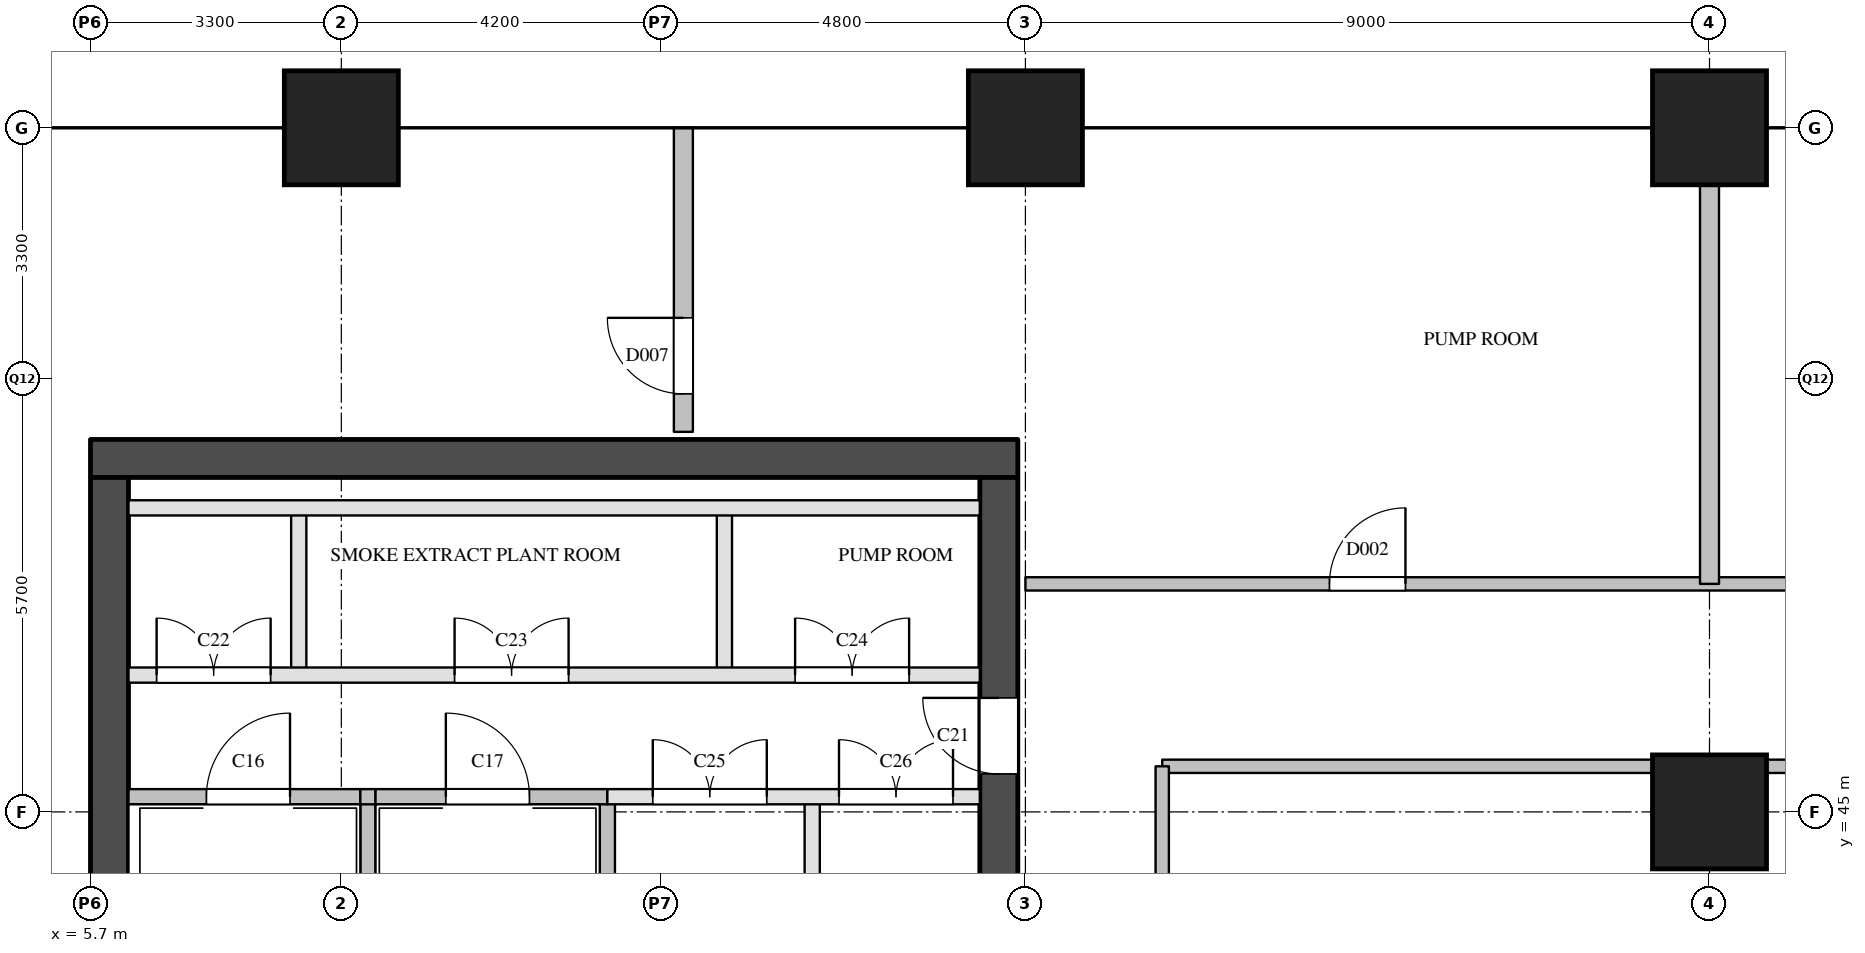
"""IFC4 building model, lengths in metres.
Left out: names, types, materials, properties, quantities, classifications, styles, units other than length and angle.
Written with IfcOpenShell. Run it as: python <this file> out.ifc"""

import sys

from ifc_helpers import new_model, si_unit, direction, frame, frame_2d, origin, origin_2d, place, context, subcontext, project, spatial, rectangle, extrude, element, fill, save


model = new_model("IFC4")
c1 = context("Model", 3, precision=1e-05, world=origin(), true_north=direction((0.0, 1.0)))
c2 = subcontext(c1, "Body", "Model", "MODEL_VIEW")
j1 = project(units=[si_unit("LENGTHUNIT", "METRE"), si_unit("PLANEANGLEUNIT", "RADIAN")], contexts=[c1])
p1 = place(None, origin())
s1 = spatial("IfcSite", under=j1, at=p1, CompositionType="ELEMENT")
p2 = place(p1, origin())
s2 = spatial("IfcBuilding", under=s1, at=p2, CompositionType="ELEMENT")
p3 = place(p2, frame((0.0, 0.0, 197.3)))
s3 = spatial("IfcBuildingStorey", under=s2, at=p3, CompositionType="ELEMENT", Elevation=197.3)
for number, where, z_axis, x_axis in (
    (1, (9.0, 54.0, 0.0), (0.0, 0.0, 1.0), (1.0, 0.0, 0.0)),
    (2, (18.0, 54.0, 0.0), (0.0, 0.0, 1.0), (1.0, 0.0, 0.0)),
    (3, (27.0, 45.0, 0.0), (0.0, 0.0, 1.0), (1.0, 0.0, 0.0)),
    (4, (27.0, 54.0, 0.0), (0.0, 0.0, 1.0), (1.0, 0.0, 0.0)),
):
    element("IfcColumn", number, at=place(p3, frame(where, z_axis=z_axis, x_axis=x_axis)), inside=s3, PredefinedType="COLUMN", context=c2, shape_type="SweptSolid", body=[
        extrude(rectangle(XDim=1.5, YDim=1.5, at=origin_2d()), origin(), (0.0, 0.0, 1.0), 6.0),
    ])
p4 = place(p3, frame((5.7, 49.65, 0.0), z_axis=(0.0, 0.0, 1.0), x_axis=(1.0, 0.0, 0.0)))
e5 = element("IfcWall", 5, at=p4, inside=s3, PredefinedType="SHEAR", context=c2, shape_type="SweptSolid", body=[
    extrude(rectangle(XDim=12.2, YDim=0.5, at=frame_2d((6.1, 0.0))), origin(), (0.0, 0.0, 1.0), 5.7),
])
p5 = place(p3, frame((5.95, 29.1, 0.0), z_axis=(0.0, 0.0, 1.0), x_axis=(0.0, 1.0, 0.0)))
e6 = element("IfcWall", 6, at=p5, inside=s3, PredefinedType="SHEAR", context=c2, shape_type="SweptSolid", body=[
    extrude(rectangle(XDim=20.3, YDim=0.5, at=frame_2d((10.15, 0.0))), origin(), (0.0, 0.0, 1.0), 5.7),
])
p6 = place(p5, frame((3.45, 0.0, 0.0)))
e7 = element("IfcOpeningElement", 7, at=p6, cuts=e6, PredefinedType="OPENING", context=c2, shape_type="SweptSolid", body=[
    extrude(rectangle(XDim=1.0, YDim=2.1, at=frame_2d((0.5, 1.05))), frame((0.0, 0.26, 0.0), z_axis=(0.0, -1.0, 0.0), x_axis=(1.0, 0.0, 0.0)), (0.0, 0.0, 1.0), 0.52),
])
p7 = place(p3, frame((17.65, 29.1, 0.0), z_axis=(0.0, 0.0, 1.0), x_axis=(0.0, 1.0, 0.0)))
e8 = element("IfcWall", 8, at=p7, inside=s3, PredefinedType="SHEAR", context=c2, shape_type="SweptSolid", body=[
    extrude(rectangle(XDim=20.3, YDim=0.5, at=frame_2d((10.15, 0.0))), origin(), (0.0, 0.0, 1.0), 5.7),
])
p8 = place(p7, frame((1.25, 0.0, 0.0)))
e9 = element("IfcOpeningElement", 9, at=p8, cuts=e8, PredefinedType="OPENING", context=c2, shape_type="SweptSolid", body=[
    extrude(rectangle(XDim=0.7, YDim=2.1, at=frame_2d((0.35, 1.05))), frame((0.0, 0.26, 0.0), z_axis=(0.0, -1.0, 0.0), x_axis=(1.0, 0.0, 0.0)), (0.0, 0.0, 1.0), 0.52),
])
p9 = place(p7, frame((7.05, 0.0, 0.0)))
e10 = element("IfcOpeningElement", 10, at=p9, cuts=e8, PredefinedType="OPENING", context=c2, shape_type="SweptSolid", body=[
    extrude(rectangle(XDim=0.7, YDim=2.1, at=frame_2d((0.35, 1.05))), frame((0.0, 0.26, 0.0), z_axis=(0.0, -1.0, 0.0), x_axis=(1.0, 0.0, 0.0)), (0.0, 0.0, 1.0), 0.52),
])
p10 = place(p7, frame((3.6, 0.0, 0.0)))
e11 = element("IfcOpeningElement", 11, at=p10, cuts=e8, PredefinedType="OPENING", context=c2, shape_type="SweptSolid", body=[
    extrude(rectangle(XDim=1.8, YDim=2.1, at=frame_2d((0.9, 1.05))), frame((0.0, 0.26, 0.0), z_axis=(0.0, -1.0, 0.0), x_axis=(1.0, 0.0, 0.0)), (0.0, 0.0, 1.0), 0.52),
])
p11 = place(p7, frame((16.4, 0.0, 0.0)))
e12 = element("IfcOpeningElement", 12, at=p11, cuts=e8, PredefinedType="OPENING", context=c2, shape_type="SweptSolid", body=[
    extrude(rectangle(XDim=1.0, YDim=2.1, at=frame_2d((0.5, 1.05))), frame((0.0, 0.26, 0.0), z_axis=(0.0, -1.0, 0.0), x_axis=(1.0, 0.0, 0.0)), (0.0, 0.0, 1.0), 0.52),
])
p12 = place(p3, frame((8.44, 46.8, 0.0), z_axis=(0.0, 0.0, 1.0), x_axis=(0.0, 1.0, 0.0)))
e13 = element("IfcWall", 13, at=p12, inside=s3, PredefinedType="PARTITIONING", context=c2, shape_type="SweptSolid", body=[
    extrude(rectangle(XDim=2.2, YDim=0.2, at=frame_2d((1.1, 0.0))), origin(), (0.0, 0.0, 1.0), 5.7),
])
for number, where, z_axis, x_axis in (
    (14, (9.35, 43.7, 0.0), (0.0, 0.0, 1.0), (0.0, 1.0, 0.0)),
    (15, (12.5, 43.7, 0.0), (0.0, 0.0, 1.0), (0.0, 1.0, 0.0)),
):
    element("IfcWall", number, at=place(p3, frame(where, z_axis=z_axis, x_axis=x_axis)), inside=s3, PredefinedType="SOLIDWALL", context=c2, shape_type="SweptSolid", body=[
        extrude(rectangle(XDim=1.5, YDim=0.2, at=frame_2d((0.75, 0.0))), origin(), (0.0, 0.0, 1.0), 5.7),
    ])
p13 = place(p3, frame((14.04, 46.8, 0.0), z_axis=(0.0, 0.0, 1.0), x_axis=(0.0, 1.0, 0.0)))
e16 = element("IfcWall", 16, at=p13, inside=s3, PredefinedType="PARTITIONING", context=c2, shape_type="SweptSolid", body=[
    extrude(rectangle(XDim=2.2, YDim=0.2, at=frame_2d((1.1, 0.0))), origin(), (0.0, 0.0, 1.0), 5.7),
])
p14 = place(p3, frame((15.195, 39.0, 0.0), z_axis=(0.0, 0.0, 1.0), x_axis=(0.0, 1.0, 0.0)))
e17 = element("IfcWall", 17, at=p14, inside=s3, PredefinedType="PARTITIONING", context=c2, shape_type="SweptSolid", body=[
    extrude(rectangle(XDim=6.2, YDim=0.2, at=frame_2d((3.1, 0.0))), origin(), (0.0, 0.0, 1.0), 5.7),
])
p15 = place(p3, frame((12.5, 45.2, 0.0), z_axis=(0.0, 0.0, 1.0), x_axis=(1.0, 0.0, 0.0)))
e18 = element("IfcWall", 18, at=p15, inside=s3, PredefinedType="PARTITIONING", context=c2, shape_type="SweptSolid", body=[
    extrude(rectangle(XDim=4.9, YDim=0.2, at=frame_2d((2.45, 0.0))), origin(), (0.0, 0.0, 1.0), 5.7),
])
p16 = place(p15, frame((0.597, 0.0, 0.0)))
e19 = element("IfcOpeningElement", 19, at=p16, cuts=e18, PredefinedType="OPENING", context=c2, shape_type="SweptSolid", body=[
    extrude(rectangle(XDim=1.5, YDim=2.1, at=frame_2d((0.75, 1.05))), frame((0.0, 0.11, 0.0), z_axis=(0.0, -1.0, 0.0), x_axis=(1.0, 0.0, 0.0)), (0.0, 0.0, 1.0), 0.22),
])
p17 = place(p15, frame((3.048, 0.0, 0.0)))
e20 = element("IfcOpeningElement", 20, at=p17, cuts=e18, PredefinedType="OPENING", context=c2, shape_type="SweptSolid", body=[
    extrude(rectangle(XDim=1.5, YDim=2.1, at=frame_2d((0.75, 1.05))), frame((0.0, 0.11, 0.0), z_axis=(0.0, -1.0, 0.0), x_axis=(1.0, 0.0, 0.0)), (0.0, 0.0, 1.0), 0.22),
])
p18 = place(p3, frame((6.2, 45.2, 0.0), z_axis=(0.0, 0.0, 1.0), x_axis=(1.0, 0.0, 0.0)))
e21 = element("IfcWall", 21, at=p18, inside=s3, PredefinedType="SOLIDWALL", context=c2, shape_type="SweptSolid", body=[
    extrude(rectangle(XDim=3.05, YDim=0.2, at=frame_2d((1.525, 0.0))), origin(), (0.0, 0.0, 1.0), 5.7),
])
p19 = place(p18, frame((1.025, 0.0, 0.0)))
e22 = element("IfcOpeningElement", 22, at=p19, cuts=e21, PredefinedType="OPENING", context=c2, shape_type="SweptSolid", body=[
    extrude(rectangle(XDim=1.1, YDim=2.1, at=frame_2d((0.55, 1.05))), frame((0.0, 0.11, 0.0), z_axis=(0.0, -1.0, 0.0), x_axis=(1.0, 0.0, 0.0)), (0.0, 0.0, 1.0), 0.22),
])
p20 = place(p3, frame((9.25, 45.2, 0.0), z_axis=(0.0, 0.0, 1.0), x_axis=(1.0, 0.0, 0.0)))
e23 = element("IfcWall", 23, at=p20, inside=s3, PredefinedType="SOLIDWALL", context=c2, shape_type="SweptSolid", body=[
    extrude(rectangle(XDim=0.2, YDim=0.2, at=frame_2d((0.1, 0.0))), origin(), (0.0, 0.0, 1.0), 5.7),
])
p21 = place(p3, frame((9.45, 45.2, 0.0), z_axis=(0.0, 0.0, 1.0), x_axis=(1.0, 0.0, 0.0)))
e24 = element("IfcWall", 24, at=p21, inside=s3, PredefinedType="SOLIDWALL", context=c2, shape_type="SweptSolid", body=[
    extrude(rectangle(XDim=3.05, YDim=0.2, at=frame_2d((1.525, 0.0))), origin(), (0.0, 0.0, 1.0), 5.7),
])
p22 = place(p21, frame((0.925, 0.0, 0.0)))
e25 = element("IfcOpeningElement", 25, at=p22, cuts=e24, PredefinedType="OPENING", context=c2, shape_type="SweptSolid", body=[
    extrude(rectangle(XDim=1.1, YDim=2.1, at=frame_2d((0.55, 1.05))), frame((0.0, 0.11, 0.0), z_axis=(0.0, -1.0, 0.0), x_axis=(1.0, 0.0, 0.0)), (0.0, 0.0, 1.0), 0.22),
])
p23 = place(p3, frame((6.2, 46.8, 0.0), z_axis=(0.0, 0.0, 1.0), x_axis=(1.0, 0.0, 0.0)))
e26 = element("IfcWall", 26, at=p23, inside=s3, PredefinedType="PARTITIONING", context=c2, shape_type="SweptSolid", body=[
    extrude(rectangle(XDim=11.2, YDim=0.2, at=frame_2d((5.6, 0.0))), origin(), (0.0, 0.0, 1.0), 5.7),
])
p24 = place(p23, frame((0.37, 0.0, 0.0)))
e27 = element("IfcOpeningElement", 27, at=p24, cuts=e26, PredefinedType="OPENING", context=c2, shape_type="SweptSolid", body=[
    extrude(rectangle(XDim=1.5, YDim=2.1, at=frame_2d((0.75, 1.05))), frame((0.0, 0.11, 0.0), z_axis=(0.0, -1.0, 0.0), x_axis=(1.0, 0.0, 0.0)), (0.0, 0.0, 1.0), 0.22),
])
p25 = place(p23, frame((4.29, 0.0, 0.0)))
e28 = element("IfcOpeningElement", 28, at=p25, cuts=e26, PredefinedType="OPENING", context=c2, shape_type="SweptSolid", body=[
    extrude(rectangle(XDim=1.5, YDim=2.1, at=frame_2d((0.75, 1.05))), frame((0.0, 0.11, 0.0), z_axis=(0.0, -1.0, 0.0), x_axis=(1.0, 0.0, 0.0)), (0.0, 0.0, 1.0), 0.22),
])
p26 = place(p23, frame((8.77, 0.0, 0.0)))
e29 = element("IfcOpeningElement", 29, at=p26, cuts=e26, PredefinedType="OPENING", context=c2, shape_type="SweptSolid", body=[
    extrude(rectangle(XDim=1.5, YDim=2.1, at=frame_2d((0.75, 1.05))), frame((0.0, 0.11, 0.0), z_axis=(0.0, -1.0, 0.0), x_axis=(1.0, 0.0, 0.0)), (0.0, 0.0, 1.0), 0.22),
])
p27 = place(p3, frame((6.2, 49.0, 0.0), z_axis=(0.0, 0.0, 1.0), x_axis=(1.0, 0.0, 0.0)))
e30 = element("IfcWall", 30, at=p27, inside=s3, PredefinedType="PARTITIONING", context=c2, shape_type="SweptSolid", body=[
    extrude(rectangle(XDim=11.2, YDim=0.2, at=frame_2d((5.6, 0.0))), origin(), (0.0, 0.0, 1.0), 5.7),
])
p28 = place(p3, frame((19.8, 45.6, 0.0), z_axis=(0.0, 0.0, 1.0), x_axis=(1.0, 0.0, 0.0)))
e31 = element("IfcWall", 31, at=p28, inside=s3, PredefinedType="PARTITIONING", context=c2, shape_type="SweptSolid", body=[
    extrude(rectangle(XDim=14.4, YDim=0.175, at=frame_2d((7.2, 0.0))), origin(), (0.0, 0.0, 1.0), 5.7),
])
p29 = place(p3, frame((18.0, 48.0, 0.0), z_axis=(0.0, 0.0, 1.0), x_axis=(1.0, 0.0, 0.0)))
e32 = element("IfcWall", 32, at=p29, inside=s3, PredefinedType="PARTITIONING", context=c2, shape_type="SweptSolid", body=[
    extrude(rectangle(XDim=18.0, YDim=0.175, at=frame_2d((9.0, 0.0))), origin(), (0.0, 0.0, 1.0), 5.7),
])
p30 = place(p29, frame((4.0, 0.0, 0.0)))
e33 = element("IfcOpeningElement", 33, at=p30, cuts=e32, PredefinedType="OPENING", context=c2, shape_type="SweptSolid", body=[
    extrude(rectangle(XDim=1.0, YDim=2.1, at=frame_2d((0.5, 1.05))), frame((0.0, 0.097, 0.0), z_axis=(0.0, -1.0, 0.0), x_axis=(1.0, 0.0, 0.0)), (0.0, 0.0, 1.0), 0.195),
])
p31 = place(p29, frame((13.0, 0.0, 0.0)))
e34 = element("IfcOpeningElement", 34, at=p31, cuts=e32, PredefinedType="OPENING", context=c2, shape_type="SweptSolid", body=[
    extrude(rectangle(XDim=1.0, YDim=2.1, at=frame_2d((0.5, 1.05))), frame((0.0, 0.097, 0.0), z_axis=(0.0, -1.0, 0.0), x_axis=(1.0, 0.0, 0.0)), (0.0, 0.0, 1.0), 0.195),
])
p32 = place(p3, frame((19.8, 35.4, 0.0), z_axis=(0.0, 0.0, 1.0), x_axis=(0.0, 1.0, 0.0)))
e35 = element("IfcWall", 35, at=p32, inside=s3, PredefinedType="PARTITIONING", context=c2, shape_type="SweptSolid", body=[
    extrude(rectangle(XDim=10.2, YDim=0.175, at=frame_2d((5.1, 0.0))), origin(), (0.0, 0.0, 1.0), 4.59),
])
p33 = place(p3, frame((13.5, 50.0, 0.0), z_axis=(0.0, 0.0, 1.0), x_axis=(0.0, 1.0, 0.0)))
e36 = element("IfcWall", 36, at=p33, inside=s3, PredefinedType="PARTITIONING", context=c2, shape_type="SweptSolid", body=[
    extrude(rectangle(XDim=4.0, YDim=0.25, at=frame_2d((2.0, 0.0))), origin(), (0.0, 0.0, 1.0), 5.7),
])
p34 = place(p33, frame((0.5, 0.0, 0.0)))
e37 = element("IfcOpeningElement", 37, at=p34, cuts=e36, PredefinedType="OPENING", context=c2, shape_type="SweptSolid", body=[
    extrude(rectangle(XDim=1.0, YDim=2.1, at=frame_2d((0.5, 1.05))), frame((0.0, 0.135, 0.0), z_axis=(0.0, -1.0, 0.0), x_axis=(1.0, 0.0, 0.0)), (0.0, 0.0, 1.0), 0.27),
])
p35 = place(p3, frame((27.0, 48.0, 0.0), z_axis=(0.0, 0.0, 1.0), x_axis=(0.0, 1.0, 0.0)))
e38 = element("IfcWall", 38, at=p35, inside=s3, PredefinedType="PARTITIONING", context=c2, shape_type="SweptSolid", body=[
    extrude(rectangle(XDim=6.0, YDim=0.25, at=frame_2d((3.0, 0.0))), origin(), (0.0, 0.0, 1.0), 5.7),
])
p36 = place(p19, origin())
e39 = element("IfcDoor", 39, at=p36, inside=s3, OperationType="SINGLE_SWING_RIGHT", PredefinedType="DOOR", context=c2, shape_type="SweptSolid", body=[
    extrude(rectangle(XDim=1.1, YDim=2.1, at=frame_2d((0.55, 1.05))), frame((0.0, 0.025, 0.0), z_axis=(0.0, -1.0, 0.0), x_axis=(1.0, 0.0, 0.0)), (0.0, 0.0, 1.0), 0.05),
])
fill(e22, e39)
p37 = place(p22, origin())
e40 = element("IfcDoor", 40, at=p37, inside=s3, OperationType="SINGLE_SWING_LEFT", PredefinedType="DOOR", context=c2, shape_type="SweptSolid", body=[
    extrude(rectangle(XDim=1.1, YDim=2.1, at=frame_2d((0.55, 1.05))), frame((0.0, 0.025, 0.0), z_axis=(0.0, -1.0, 0.0), x_axis=(1.0, 0.0, 0.0)), (0.0, 0.0, 1.0), 0.05),
])
fill(e25, e40)
p38 = place(p11, origin())
e41 = element("IfcDoor", 41, at=p38, inside=s3, OperationType="SINGLE_SWING_RIGHT", PredefinedType="DOOR", context=c2, shape_type="SweptSolid", body=[
    extrude(rectangle(XDim=1.0, YDim=2.1, at=frame_2d((0.5, 1.05))), frame((0.0, 0.025, 0.0), z_axis=(0.0, -1.0, 0.0), x_axis=(1.0, 0.0, 0.0)), (0.0, 0.0, 1.0), 0.05),
])
fill(e12, e41)
p39 = place(p24, origin())
e42 = element("IfcDoor", 42, at=p39, inside=s3, OperationType="DOUBLE_DOOR_SINGLE_SWING", PredefinedType="DOOR", context=c2, shape_type="SweptSolid", body=[
    extrude(rectangle(XDim=1.5, YDim=2.1, at=frame_2d((0.75, 1.05))), frame((0.0, 0.025, 0.0), z_axis=(0.0, -1.0, 0.0), x_axis=(1.0, 0.0, 0.0)), (0.0, 0.0, 1.0), 0.05),
])
fill(e27, e42)
p40 = place(p25, origin())
e43 = element("IfcDoor", 43, at=p40, inside=s3, OperationType="DOUBLE_DOOR_SINGLE_SWING", PredefinedType="DOOR", context=c2, shape_type="SweptSolid", body=[
    extrude(rectangle(XDim=1.5, YDim=2.1, at=frame_2d((0.75, 1.05))), frame((0.0, 0.025, 0.0), z_axis=(0.0, -1.0, 0.0), x_axis=(1.0, 0.0, 0.0)), (0.0, 0.0, 1.0), 0.05),
])
fill(e28, e43)
p41 = place(p26, origin())
e44 = element("IfcDoor", 44, at=p41, inside=s3, OperationType="DOUBLE_DOOR_SINGLE_SWING", PredefinedType="DOOR", context=c2, shape_type="SweptSolid", body=[
    extrude(rectangle(XDim=1.5, YDim=2.1, at=frame_2d((0.75, 1.05))), frame((0.0, 0.025, 0.0), z_axis=(0.0, -1.0, 0.0), x_axis=(1.0, 0.0, 0.0)), (0.0, 0.0, 1.0), 0.05),
])
fill(e29, e44)
p42 = place(p16, origin())
e45 = element("IfcDoor", 45, at=p42, inside=s3, OperationType="DOUBLE_DOOR_SINGLE_SWING", PredefinedType="DOOR", context=c2, shape_type="SweptSolid", body=[
    extrude(rectangle(XDim=1.5, YDim=2.1, at=frame_2d((0.75, 1.05))), frame((0.0, 0.025, 0.0), z_axis=(0.0, -1.0, 0.0), x_axis=(1.0, 0.0, 0.0)), (0.0, 0.0, 1.0), 0.05),
])
fill(e19, e45)
p43 = place(p17, origin())
e46 = element("IfcDoor", 46, at=p43, inside=s3, OperationType="DOUBLE_DOOR_SINGLE_SWING", PredefinedType="DOOR", context=c2, shape_type="SweptSolid", body=[
    extrude(rectangle(XDim=1.5, YDim=2.1, at=frame_2d((0.75, 1.05))), frame((0.0, 0.025, 0.0), z_axis=(0.0, -1.0, 0.0), x_axis=(1.0, 0.0, 0.0)), (0.0, 0.0, 1.0), 0.05),
])
fill(e20, e46)
p44 = place(p30, origin())
e47 = element("IfcDoor", 47, at=p44, inside=s3, OperationType="SINGLE_SWING_RIGHT", PredefinedType="DOOR", context=c2, shape_type="SweptSolid", body=[
    extrude(rectangle(XDim=1.0, YDim=2.1, at=frame_2d((0.5, 1.05))), frame((0.0, 0.025, 0.0), z_axis=(0.0, -1.0, 0.0), x_axis=(1.0, 0.0, 0.0)), (0.0, 0.0, 1.0), 0.05),
])
fill(e33, e47)
p45 = place(p34, origin())
e48 = element("IfcDoor", 48, at=p45, inside=s3, OperationType="SINGLE_SWING_RIGHT", PredefinedType="DOOR", context=c2, shape_type="SweptSolid", body=[
    extrude(rectangle(XDim=1.0, YDim=2.1, at=frame_2d((0.5, 1.05))), frame((0.0, 0.025, 0.0), z_axis=(0.0, -1.0, 0.0), x_axis=(1.0, 0.0, 0.0)), (0.0, 0.0, 1.0), 0.05),
])
fill(e37, e48)
save(model, sys.argv[1])
